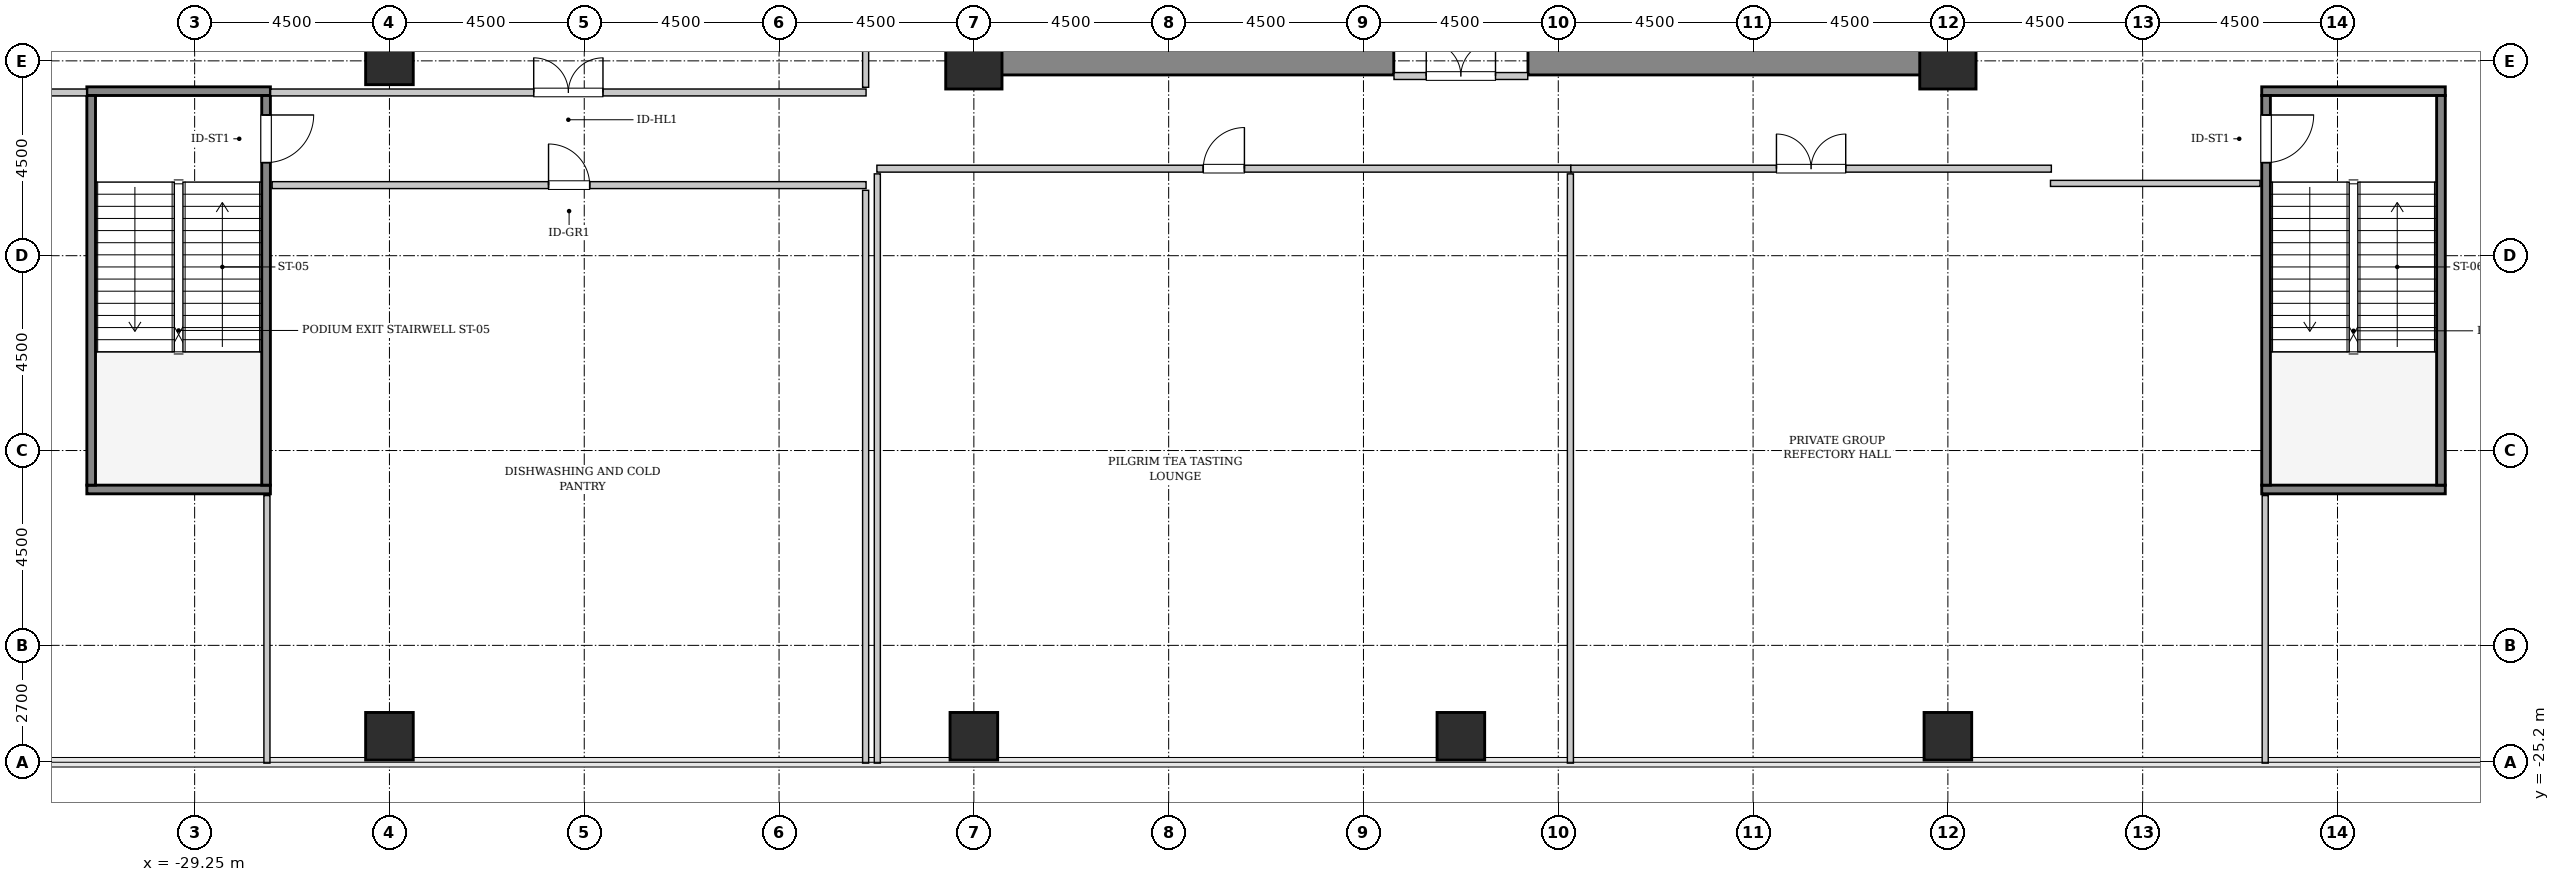
"""IFC4 building model, lengths in metres.
Left out: names, types, materials, properties, quantities, classifications, styles, units other than length and angle.
Written with IfcOpenShell. Run it as: python <this file> out.ifc"""

import sys

from ifc_helpers import new_model, si_unit, direction, frame, frame_2d, origin, origin_2d, place, context, subcontext, project, spatial, rectangle, hollow_rectangle, extrude, source, transform, mapped, element, fill, save


model = new_model("IFC4")
c1 = context("Model", 3, precision=1e-05, world=origin(), true_north=direction((0.0, 1.0)))
c2 = subcontext(c1, "Body", "Model", "MODEL_VIEW")
j1 = project(units=[si_unit("LENGTHUNIT", "METRE"), si_unit("PLANEANGLEUNIT", "RADIAN")], contexts=[c1])
p1 = place(None, origin())
s1 = spatial("IfcSite", under=j1, at=p1, CompositionType="ELEMENT")
p2 = place(p1, origin())
s2 = spatial("IfcBuilding", under=s1, at=p2, CompositionType="ELEMENT")
p3 = place(p2, frame((0.0, 0.0, 16.8)))
s3 = spatial("IfcBuildingStorey", under=s2, at=p3, CompositionType="ELEMENT", Elevation=16.8)
m1 = source(origin(), c2, "Body", "SweptSolid", [
    extrude(rectangle(XDim=10.025, YDim=0.65, at=frame_2d((5.012, 0.0))), origin(), (0.0, 0.0, 1.0), 5.4),
])
for number, where, z_axis, x_axis in (
    (1, (-11.575, -9.0, 0.0), (0.0, 0.0, 1.0), (1.0, 0.0, 0.0)),
    (2, (1.55, -9.0, 0.0), (0.0, 0.0, 1.0), (1.0, 0.0, 0.0)),
):
    element("IfcWall", number, at=place(p3, frame(where, z_axis=z_axis, x_axis=x_axis)), inside=s3, PredefinedType="SHEAR", context=c2, shape_type="MappedRepresentation", body=[
        mapped(m1, transform((0.0, 0.0, 0.0), x_axis=(1.0, 0.0, 0.0), y_axis=(0.0, 1.0, 0.0), z_axis=(0.0, 0.0, 1.0), scale=1.0)),
    ])
m2 = source(origin(), c2, "Body", "SweptSolid", [
    extrude(hollow_rectangle(XDim=1.1, YDim=1.1, WallThickness=0.055, InnerFilletRadius=0.055, OuterFilletRadius=0.11, at=origin_2d()), origin(), (0.0, 0.0, 1.0), 5.4),
])
p4 = place(p3, frame((-24.75, -24.6, 0.0), z_axis=(0.0, 0.0, 1.0), x_axis=(1.0, 0.0, 0.0)))
e3 = element("IfcColumn", 3, at=p4, inside=s3, PredefinedType="COLUMN", context=c2, shape_type="MappedRepresentation", body=[
    mapped(m2, transform((0.0, 0.0, 0.0), x_axis=(1.0, 0.0, 0.0), y_axis=(0.0, 1.0, 0.0), z_axis=(0.0, 0.0, 1.0), scale=1.0)),
])
m3 = source(origin(), c2, "Body", "SweptSolid", [
    extrude(hollow_rectangle(XDim=1.1, YDim=1.1, WallThickness=0.055, InnerFilletRadius=0.055, OuterFilletRadius=0.11, at=origin_2d()), origin(), (0.0, 0.0, 1.0), 5.4),
])
p5 = place(p3, frame((-24.75, -9.0, 0.0), z_axis=(0.0, 0.0, 1.0), x_axis=(1.0, 0.0, 0.0)))
e4 = element("IfcColumn", 4, at=p5, inside=s3, PredefinedType="COLUMN", context=c2, shape_type="MappedRepresentation", body=[
    mapped(m3, transform((0.0, 0.0, 0.0), x_axis=(1.0, 0.0, 0.0), y_axis=(0.0, 1.0, 0.0), z_axis=(0.0, 0.0, 1.0), scale=1.0)),
])
p6 = place(p3, frame((-11.25, -24.6, 0.0), z_axis=(0.0, 0.0, 1.0), x_axis=(1.0, 0.0, 0.0)))
e5 = element("IfcColumn", 5, at=p6, inside=s3, PredefinedType="COLUMN", context=c2, shape_type="MappedRepresentation", body=[
    mapped(m2, transform((0.0, 0.0, 0.0), x_axis=(1.0, 0.0, 0.0), y_axis=(0.0, 1.0, 0.0), z_axis=(0.0, 0.0, 1.0), scale=1.0)),
])
m4 = source(origin(), c2, "Body", "SweptSolid", [
    extrude(hollow_rectangle(XDim=1.3, YDim=1.3, WallThickness=0.065, InnerFilletRadius=0.065, OuterFilletRadius=0.13, at=origin_2d()), origin(), (0.0, 0.0, 1.0), 5.4),
])
p7 = place(p3, frame((-11.25, -9.0, 0.0), z_axis=(0.0, 0.0, 1.0), x_axis=(1.0, 0.0, 0.0)))
e6 = element("IfcColumn", 6, at=p7, inside=s3, PredefinedType="COLUMN", context=c2, shape_type="MappedRepresentation", body=[
    mapped(m4, transform((0.0, 0.0, 0.0), x_axis=(1.0, 0.0, 0.0), y_axis=(0.0, 1.0, 0.0), z_axis=(0.0, 0.0, 1.0), scale=1.0)),
])
for number, where, z_axis, x_axis in (
    (7, (0.0, -24.6, 0.0), (0.0, 0.0, 1.0), (1.0, 0.0, 0.0)),
    (8, (11.25, -24.6, 0.0), (0.0, 0.0, 1.0), (1.0, 0.0, 0.0)),
):
    element("IfcColumn", number, at=place(p3, frame(where, z_axis=z_axis, x_axis=x_axis)), inside=s3, PredefinedType="COLUMN", context=c2, shape_type="MappedRepresentation", body=[
        mapped(m2, transform((0.0, 0.0, 0.0), x_axis=(1.0, 0.0, 0.0), y_axis=(0.0, 1.0, 0.0), z_axis=(0.0, 0.0, 1.0), scale=1.0)),
    ])
p8 = place(p3, frame((11.25, -9.0, 0.0), z_axis=(0.0, 0.0, 1.0), x_axis=(1.0, 0.0, 0.0)))
e9 = element("IfcColumn", 9, at=p8, inside=s3, PredefinedType="COLUMN", context=c2, shape_type="MappedRepresentation", body=[
    mapped(m4, transform((0.0, 0.0, 0.0), x_axis=(1.0, 0.0, 0.0), y_axis=(0.0, 1.0, 0.0), z_axis=(0.0, 0.0, 1.0), scale=1.0)),
])
m5 = source(origin(), c2, "Body", "SweptSolid", [
    extrude(rectangle(XDim=4.24, YDim=0.2, at=frame_2d((2.12, 0.0))), origin(), (0.0, 0.0, 1.0), 5.4),
])
for number, where, z_axis, x_axis in (
    (10, (-31.74, -9.7, 0.0), (0.0, 0.0, 1.0), (1.0, 0.0, 0.0)),
    (11, (-31.74, -18.9, 0.0), (0.0, 0.0, 1.0), (1.0, 0.0, 0.0)),
):
    element("IfcWall", number, at=place(p3, frame(where, z_axis=z_axis, x_axis=x_axis)), inside=s3, PredefinedType="SOLIDWALL", context=c2, shape_type="MappedRepresentation", body=[
        mapped(m5, transform((0.0, 0.0, 0.0), x_axis=(1.0, 0.0, 0.0), y_axis=(0.0, 1.0, 0.0), z_axis=(0.0, 0.0, 1.0), scale=1.0)),
    ])
m6 = source(origin(), c2, "Body", "SweptSolid", [
    extrude(rectangle(XDim=9.0, YDim=0.2, at=frame_2d((4.5, 0.0))), origin(), (0.0, 0.0, 1.0), 5.4),
])
p9 = place(p3, frame((-31.64, -9.8, 0.0), z_axis=(0.0, 0.0, 1.0), x_axis=(0.0, -1.0, 0.0)))
e12 = element("IfcWall", 12, at=p9, inside=s3, PredefinedType="SOLIDWALL", context=c2, shape_type="MappedRepresentation", body=[
    mapped(m6, transform((0.0, 0.0, 0.0), x_axis=(1.0, 0.0, 0.0), y_axis=(0.0, 1.0, 0.0), z_axis=(0.0, 0.0, 1.0), scale=1.0)),
])
p10 = place(p3, frame((-27.6, -9.8, 0.0), z_axis=(0.0, 0.0, 1.0), x_axis=(0.0, -1.0, 0.0)))
e13 = element("IfcWall", 13, at=p10, inside=s3, PredefinedType="SOLIDWALL", context=c2, shape_type="MappedRepresentation", body=[
    mapped(m6, transform((0.0, 0.0, 0.0), x_axis=(1.0, 0.0, 0.0), y_axis=(0.0, 1.0, 0.0), z_axis=(0.0, 0.0, 1.0), scale=1.0)),
])
p11 = place(p10, frame((0.45, 0.0, 0.0)))
e14 = element("IfcOpeningElement", 14, at=p11, cuts=e13, PredefinedType="OPENING", context=c2, shape_type="SweptSolid", body=[
    extrude(rectangle(XDim=1.1, YDim=2.15, at=frame_2d((0.55, 1.075))), frame((0.0, 0.11, 0.0), z_axis=(0.0, -1.0, 0.0), x_axis=(1.0, 0.0, 0.0)), (0.0, 0.0, 1.0), 0.22),
])
for number, where, z_axis, x_axis in (
    (15, (18.5, -9.7, 0.0), (0.0, 0.0, 1.0), (1.0, 0.0, 0.0)),
    (16, (18.5, -18.9, 0.0), (0.0, 0.0, 1.0), (1.0, 0.0, 0.0)),
):
    element("IfcWall", number, at=place(p3, frame(where, z_axis=z_axis, x_axis=x_axis)), inside=s3, PredefinedType="SOLIDWALL", context=c2, shape_type="MappedRepresentation", body=[
        mapped(m5, transform((0.0, 0.0, 0.0), x_axis=(1.0, 0.0, 0.0), y_axis=(0.0, 1.0, 0.0), z_axis=(0.0, 0.0, 1.0), scale=1.0)),
    ])
p12 = place(p3, frame((18.6, -9.8, 0.0), z_axis=(0.0, 0.0, 1.0), x_axis=(0.0, -1.0, 0.0)))
e17 = element("IfcWall", 17, at=p12, inside=s3, PredefinedType="SOLIDWALL", context=c2, shape_type="MappedRepresentation", body=[
    mapped(m6, transform((0.0, 0.0, 0.0), x_axis=(1.0, 0.0, 0.0), y_axis=(0.0, 1.0, 0.0), z_axis=(0.0, 0.0, 1.0), scale=1.0)),
])
p13 = place(p12, frame((0.45, 0.0, 0.0)))
e18 = element("IfcOpeningElement", 18, at=p13, cuts=e17, PredefinedType="OPENING", context=c2, shape_type="SweptSolid", body=[
    extrude(rectangle(XDim=1.1, YDim=2.15, at=frame_2d((0.55, 1.075))), frame((0.0, 0.11, 0.0), z_axis=(0.0, -1.0, 0.0), x_axis=(1.0, 0.0, 0.0)), (0.0, 0.0, 1.0), 0.22),
])
p14 = place(p3, frame((22.64, -9.8, 0.0), z_axis=(0.0, 0.0, 1.0), x_axis=(0.0, -1.0, 0.0)))
e19 = element("IfcWall", 19, at=p14, inside=s3, PredefinedType="SOLIDWALL", context=c2, shape_type="MappedRepresentation", body=[
    mapped(m6, transform((0.0, 0.0, 0.0), x_axis=(1.0, 0.0, 0.0), y_axis=(0.0, 1.0, 0.0), z_axis=(0.0, 0.0, 1.0), scale=1.0)),
])
m7 = source(origin(), c2, "Body", "SweptSolid", [
    extrude(rectangle(XDim=3.09, YDim=0.16, at=frame_2d((1.545, 0.0))), origin(), (0.0, 0.0, 1.0), 3.975),
])
p15 = place(p3, frame((-1.545, -9.35, 0.0), z_axis=(0.0, 0.0, 1.0), x_axis=(1.0, 0.0, 0.0)))
e20 = element("IfcWall", 20, at=p15, inside=s3, PredefinedType="PARTITIONING", context=c2, shape_type="MappedRepresentation", body=[
    mapped(m7, transform((0.0, 0.0, 0.0), x_axis=(1.0, 0.0, 0.0), y_axis=(0.0, 1.0, 0.0), z_axis=(0.0, 0.0, 1.0), scale=1.0)),
])
p16 = place(p15, frame((0.745, 0.0, 0.0)))
e21 = element("IfcOpeningElement", 21, at=p16, cuts=e20, PredefinedType="OPENING", context=c2, shape_type="SweptSolid", body=[
    extrude(rectangle(XDim=1.6, YDim=2.3, at=frame_2d((0.8, 1.15))), frame((0.0, 0.09, 0.0), z_axis=(0.0, -1.0, 0.0), x_axis=(1.0, 0.0, 0.0)), (0.0, 0.0, 1.0), 0.18),
])
m8 = source(origin(), c2, "Body", "SweptSolid", [
    extrude(rectangle(XDim=6.525, YDim=0.16, at=frame_2d((3.262, 0.0))), origin(), (0.0, 0.0, 1.0), 5.085),
])
p17 = place(p3, frame((-38.27, -9.73, 0.0), z_axis=(0.0, 0.0, 1.0), x_axis=(1.0, 0.0, 0.0)))
e22 = element("IfcWall", 22, at=p17, inside=s3, PredefinedType="PARTITIONING", context=c2, shape_type="MappedRepresentation", body=[
    mapped(m8, transform((0.0, 0.0, 0.0), x_axis=(1.0, 0.0, 0.0), y_axis=(0.0, 1.0, 0.0), z_axis=(0.0, 0.0, 1.0), scale=1.0)),
])
m9 = source(origin(), c2, "Body", "SweptSolid", [
    extrude(rectangle(XDim=13.755, YDim=0.16, at=frame_2d((6.877, 0.0))), origin(), (0.0, 0.0, 1.0), 5.085),
])
p18 = place(p3, frame((-27.495, -9.73, 0.0), z_axis=(0.0, 0.0, 1.0), x_axis=(1.0, 0.0, 0.0)))
e23 = element("IfcWall", 23, at=p18, inside=s3, PredefinedType="PARTITIONING", context=c2, shape_type="MappedRepresentation", body=[
    mapped(m9, transform((0.0, 0.0, 0.0), x_axis=(1.0, 0.0, 0.0), y_axis=(0.0, 1.0, 0.0), z_axis=(0.0, 0.0, 1.0), scale=1.0)),
])
p19 = place(p18, frame((6.077, 0.0, 0.0)))
e24 = element("IfcOpeningElement", 24, at=p19, cuts=e23, PredefinedType="OPENING", context=c2, shape_type="SweptSolid", body=[
    extrude(rectangle(XDim=1.6, YDim=2.3, at=frame_2d((0.8, 1.15))), frame((0.0, 0.09, 0.0), z_axis=(0.0, -1.0, 0.0), x_axis=(1.0, 0.0, 0.0)), (0.0, 0.0, 1.0), 0.18),
])
m10 = source(origin(), c2, "Body", "SweptSolid", [
    extrude(rectangle(XDim=9.6, YDim=0.14, at=frame_2d((4.8, 0.0))), origin(), (0.0, 0.0, 1.0), 5.085),
])
p20 = place(p3, frame((-13.75, -9.61, 0.0), z_axis=(0.0, 0.0, 1.0), x_axis=(0.0, 1.0, 0.0)))
e25 = element("IfcWall", 25, at=p20, inside=s3, PredefinedType="PARTITIONING", context=c2, shape_type="MappedRepresentation", body=[
    mapped(m10, transform((0.0, 0.0, 0.0), x_axis=(1.0, 0.0, 0.0), y_axis=(0.0, 1.0, 0.0), z_axis=(0.0, 0.0, 1.0), scale=1.0)),
])
m11 = source(origin(), c2, "Body", "SweptSolid", [
    extrude(rectangle(XDim=13.72, YDim=0.16, at=frame_2d((6.86, 0.0))), origin(), (0.0, 0.0, 1.0), 5.085),
])
p21 = place(p3, frame((-27.46, -11.87, 0.0), z_axis=(0.0, 0.0, 1.0), x_axis=(1.0, 0.0, 0.0)))
e26 = element("IfcWall", 26, at=p21, inside=s3, PredefinedType="PARTITIONING", context=c2, shape_type="MappedRepresentation", body=[
    mapped(m11, transform((0.0, 0.0, 0.0), x_axis=(1.0, 0.0, 0.0), y_axis=(0.0, 1.0, 0.0), z_axis=(0.0, 0.0, 1.0), scale=1.0)),
])
p22 = place(p21, frame((6.385, 0.0, 0.0)))
e27 = element("IfcOpeningElement", 27, at=p22, cuts=e26, PredefinedType="OPENING", context=c2, shape_type="SweptSolid", body=[
    extrude(rectangle(XDim=0.95, YDim=2.1, at=frame_2d((0.475, 1.05))), frame((0.0, 0.09, 0.0), z_axis=(0.0, -1.0, 0.0), x_axis=(1.0, 0.0, 0.0)), (0.0, 0.0, 1.0), 0.18),
])
m12 = source(origin(), c2, "Body", "SweptSolid", [
    extrude(rectangle(XDim=13.23, YDim=0.14, at=frame_2d((6.615, 0.0))), origin(), (0.0, 0.0, 1.0), 5.085),
])
p23 = place(p3, frame((-13.75, -25.22, 0.0), z_axis=(0.0, 0.0, 1.0), x_axis=(0.0, 1.0, 0.0)))
e28 = element("IfcWall", 28, at=p23, inside=s3, PredefinedType="PARTITIONING", context=c2, shape_type="MappedRepresentation", body=[
    mapped(m12, transform((0.0, 0.0, 0.0), x_axis=(1.0, 0.0, 0.0), y_axis=(0.0, 1.0, 0.0), z_axis=(0.0, 0.0, 1.0), scale=1.0)),
])
m13 = source(origin(), c2, "Body", "SweptSolid", [
    extrude(rectangle(XDim=6.18, YDim=0.14, at=frame_2d((3.09, 0.0))), origin(), (0.0, 0.0, 1.0), 5.085),
])
p24 = place(p3, frame((-27.58, -25.22, 0.0), z_axis=(0.0, 0.0, 1.0), x_axis=(0.0, 1.0, 0.0)))
e29 = element("IfcWall", 29, at=p24, inside=s3, PredefinedType="PARTITIONING", context=c2, shape_type="MappedRepresentation", body=[
    mapped(m13, transform((0.0, 0.0, 0.0), x_axis=(1.0, 0.0, 0.0), y_axis=(0.0, 1.0, 0.0), z_axis=(0.0, 0.0, 1.0), scale=1.0)),
])
m14 = source(origin(), c2, "Body", "SweptSolid", [
    extrude(rectangle(XDim=16.03, YDim=0.16, at=frame_2d((8.015, 0.0))), origin(), (0.0, 0.0, 1.0), 5.085),
])
p25 = place(p3, frame((-13.49, -11.49, 0.0), z_axis=(0.0, 0.0, 1.0), x_axis=(1.0, 0.0, 0.0)))
e30 = element("IfcWall", 30, at=p25, inside=s3, PredefinedType="PARTITIONING", context=c2, shape_type="MappedRepresentation", body=[
    mapped(m14, transform((0.0, 0.0, 0.0), x_axis=(1.0, 0.0, 0.0), y_axis=(0.0, 1.0, 0.0), z_axis=(0.0, 0.0, 1.0), scale=1.0)),
])
p26 = place(p25, frame((7.54, 0.0, 0.0)))
e31 = element("IfcOpeningElement", 31, at=p26, cuts=e30, PredefinedType="OPENING", context=c2, shape_type="SweptSolid", body=[
    extrude(rectangle(XDim=0.95, YDim=2.1, at=frame_2d((0.475, 1.05))), frame((0.0, 0.09, 0.0), z_axis=(0.0, -1.0, 0.0), x_axis=(1.0, 0.0, 0.0)), (0.0, 0.0, 1.0), 0.18),
])
m15 = source(origin(), c2, "Body", "SweptSolid", [
    extrude(rectangle(XDim=13.61, YDim=0.14, at=frame_2d((6.805, 0.0))), origin(), (0.0, 0.0, 1.0), 5.085),
])
for number, where, z_axis, x_axis in (
    (32, (2.53, -25.22, 0.0), (0.0, 0.0, 1.0), (0.0, 1.0, 0.0)),
    (33, (-13.48, -25.22, 0.0), (0.0, 0.0, 1.0), (0.0, 1.0, 0.0)),
):
    element("IfcWall", number, at=place(p3, frame(where, z_axis=z_axis, x_axis=x_axis)), inside=s3, PredefinedType="PARTITIONING", context=c2, shape_type="MappedRepresentation", body=[
        mapped(m15, transform((0.0, 0.0, 0.0), x_axis=(1.0, 0.0, 0.0), y_axis=(0.0, 1.0, 0.0), z_axis=(0.0, 0.0, 1.0), scale=1.0)),
    ])
m16 = source(origin(), c2, "Body", "SweptSolid", [
    extrude(rectangle(XDim=11.1, YDim=0.16, at=frame_2d((5.55, 0.0))), origin(), (0.0, 0.0, 1.0), 5.085),
])
p27 = place(p3, frame((2.54, -11.49, 0.0), z_axis=(0.0, 0.0, 1.0), x_axis=(1.0, 0.0, 0.0)))
e34 = element("IfcWall", 34, at=p27, inside=s3, PredefinedType="PARTITIONING", context=c2, shape_type="MappedRepresentation", body=[
    mapped(m16, transform((0.0, 0.0, 0.0), x_axis=(1.0, 0.0, 0.0), y_axis=(0.0, 1.0, 0.0), z_axis=(0.0, 0.0, 1.0), scale=1.0)),
])
p28 = place(p27, frame((4.75, 0.0, 0.0)))
e35 = element("IfcOpeningElement", 35, at=p28, cuts=e34, PredefinedType="OPENING", context=c2, shape_type="SweptSolid", body=[
    extrude(rectangle(XDim=1.6, YDim=2.3, at=frame_2d((0.8, 1.15))), frame((0.0, 0.09, 0.0), z_axis=(0.0, -1.0, 0.0), x_axis=(1.0, 0.0, 0.0)), (0.0, 0.0, 1.0), 0.18),
])
m17 = source(origin(), c2, "Body", "SweptSolid", [
    extrude(rectangle(XDim=4.84, YDim=0.14, at=frame_2d((2.42, 0.0))), origin(), (0.0, 0.0, 1.0), 5.085),
])
p29 = place(p3, frame((13.62, -11.83, 0.0), z_axis=(0.0, 0.0, 1.0), x_axis=(1.0, 0.0, 0.0)))
e36 = element("IfcWall", 36, at=p29, inside=s3, PredefinedType="PARTITIONING", context=c2, shape_type="MappedRepresentation", body=[
    mapped(m17, transform((0.0, 0.0, 0.0), x_axis=(1.0, 0.0, 0.0), y_axis=(0.0, 1.0, 0.0), z_axis=(0.0, 0.0, 1.0), scale=1.0)),
])
p30 = place(p3, frame((18.58, -25.22, 0.0), z_axis=(0.0, 0.0, 1.0), x_axis=(0.0, 1.0, 0.0)))
e37 = element("IfcWall", 37, at=p30, inside=s3, PredefinedType="PARTITIONING", context=c2, shape_type="MappedRepresentation", body=[
    mapped(m13, transform((0.0, 0.0, 0.0), x_axis=(1.0, 0.0, 0.0), y_axis=(0.0, 1.0, 0.0), z_axis=(0.0, 0.0, 1.0), scale=1.0)),
])
m18 = source(origin(), c2, "Body", "SweptSolid", [
    extrude(rectangle(XDim=1.1, YDim=2.15, at=frame_2d((0.55, 1.075))), frame((0.0, 0.025, 0.0), z_axis=(0.0, -1.0, 0.0), x_axis=(1.0, 0.0, 0.0)), (0.0, 0.0, 1.0), 0.05),
])
p31 = place(p11, origin())
e38 = element("IfcDoor", 38, at=p31, inside=s3, OperationType="SINGLE_SWING_LEFT", PredefinedType="DOOR", context=c2, shape_type="MappedRepresentation", body=[
    mapped(m18, transform((0.0, 0.0, 0.0), x_axis=(1.0, 0.0, 0.0), y_axis=(0.0, 1.0, 0.0), z_axis=(0.0, 0.0, 1.0), scale=1.0)),
])
fill(e14, e38)
p32 = place(p13, origin())
e39 = element("IfcDoor", 39, at=p32, inside=s3, OperationType="SINGLE_SWING_LEFT", PredefinedType="DOOR", context=c2, shape_type="MappedRepresentation", body=[
    mapped(m18, transform((0.0, 0.0, 0.0), x_axis=(1.0, 0.0, 0.0), y_axis=(0.0, 1.0, 0.0), z_axis=(0.0, 0.0, 1.0), scale=1.0)),
])
fill(e18, e39)
m19 = source(origin(), c2, "Body", "SweptSolid", [
    extrude(rectangle(XDim=1.6, YDim=2.3, at=frame_2d((0.8, 1.15))), frame((0.0, 0.025, 0.0), z_axis=(0.0, -1.0, 0.0), x_axis=(1.0, 0.0, 0.0)), (0.0, 0.0, 1.0), 0.05),
])
p33 = place(p16, origin())
e40 = element("IfcDoor", 40, at=p33, inside=s3, OperationType="DOUBLE_DOOR_SINGLE_SWING", PredefinedType="DOOR", context=c2, shape_type="MappedRepresentation", body=[
    mapped(m19, transform((0.0, 0.0, 0.0), x_axis=(1.0, 0.0, 0.0), y_axis=(0.0, 1.0, 0.0), z_axis=(0.0, 0.0, 1.0), scale=1.0)),
])
fill(e21, e40)
p34 = place(p19, origin())
e41 = element("IfcDoor", 41, at=p34, inside=s3, OperationType="DOUBLE_DOOR_SINGLE_SWING", PredefinedType="DOOR", context=c2, shape_type="MappedRepresentation", body=[
    mapped(m19, transform((0.0, 0.0, 0.0), x_axis=(1.0, 0.0, 0.0), y_axis=(0.0, 1.0, 0.0), z_axis=(0.0, 0.0, 1.0), scale=1.0)),
])
fill(e24, e41)
m20 = source(origin(), c2, "Body", "SweptSolid", [
    extrude(rectangle(XDim=0.95, YDim=2.1, at=frame_2d((0.475, 1.05))), frame((0.0, 0.025, 0.0), z_axis=(0.0, -1.0, 0.0), x_axis=(1.0, 0.0, 0.0)), (0.0, 0.0, 1.0), 0.05),
])
p35 = place(p22, origin())
e42 = element("IfcDoor", 42, at=p35, inside=s3, OperationType="SINGLE_SWING_LEFT", PredefinedType="DOOR", context=c2, shape_type="MappedRepresentation", body=[
    mapped(m20, transform((0.0, 0.0, 0.0), x_axis=(1.0, 0.0, 0.0), y_axis=(0.0, 1.0, 0.0), z_axis=(0.0, 0.0, 1.0), scale=1.0)),
])
fill(e27, e42)
p36 = place(p26, origin())
e43 = element("IfcDoor", 43, at=p36, inside=s3, OperationType="SINGLE_SWING_RIGHT", PredefinedType="DOOR", context=c2, shape_type="MappedRepresentation", body=[
    mapped(m20, transform((0.0, 0.0, 0.0), x_axis=(1.0, 0.0, 0.0), y_axis=(0.0, 1.0, 0.0), z_axis=(0.0, 0.0, 1.0), scale=1.0)),
])
fill(e31, e43)
p37 = place(p28, origin())
e44 = element("IfcDoor", 44, at=p37, inside=s3, OperationType="DOUBLE_DOOR_SINGLE_SWING", PredefinedType="DOOR", context=c2, shape_type="MappedRepresentation", body=[
    mapped(m19, transform((0.0, 0.0, 0.0), x_axis=(1.0, 0.0, 0.0), y_axis=(0.0, 1.0, 0.0), z_axis=(0.0, 0.0, 1.0), scale=1.0)),
])
fill(e35, e44)
save(model, sys.argv[1])
